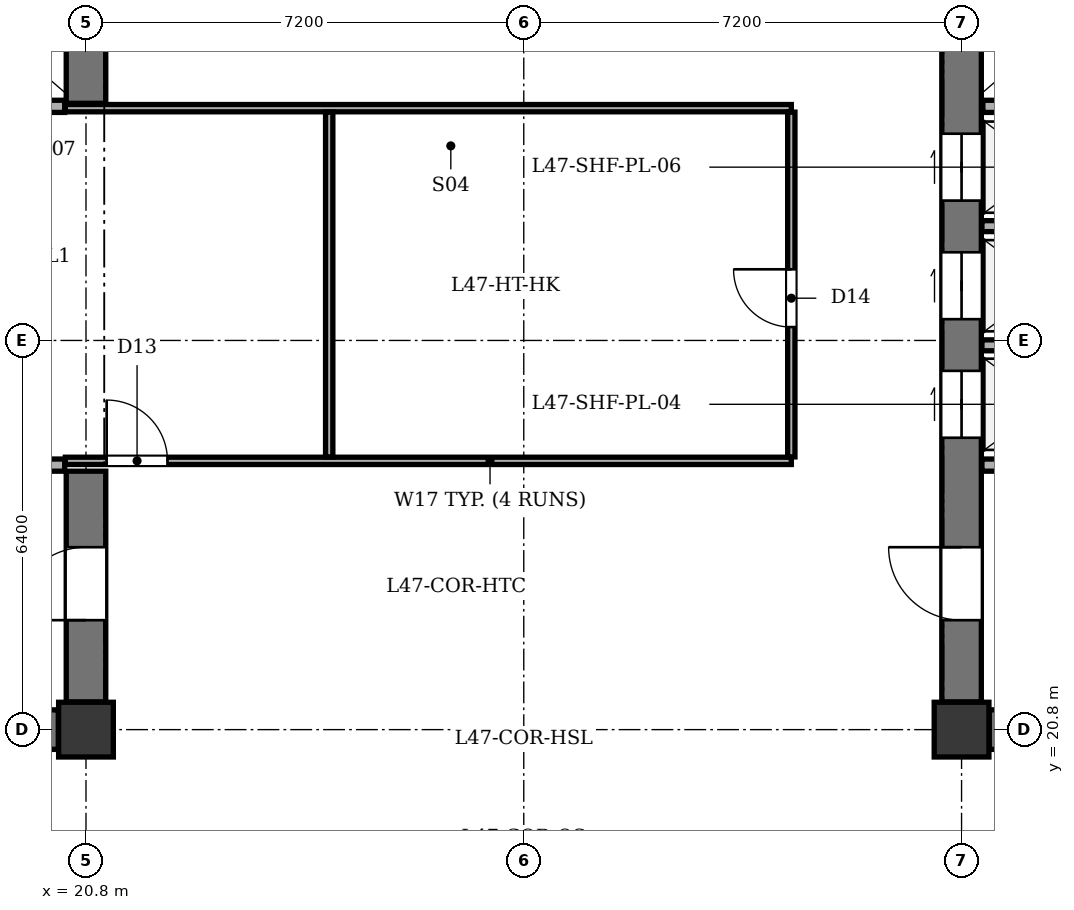
"""IFC4 building model, lengths in metres.
Left out: names, types, materials, properties, quantities, classifications, styles, units other than length and angle.
Written with IfcOpenShell. Run it as: python <this file> out.ifc"""

import sys

from ifc_helpers import new_model, si_unit, direction, frame, frame_2d, origin, origin_2d, place, context, subcontext, project, spatial, rectangle, extrude, element, fill, save


model = new_model("IFC4")
c1 = context("Model", 3, precision=1e-05, world=origin(), true_north=direction((0.0, 1.0)))
c2 = subcontext(c1, "Body", "Model", "MODEL_VIEW")
j1 = project(units=[si_unit("LENGTHUNIT", "METRE"), si_unit("PLANEANGLEUNIT", "RADIAN")], contexts=[c1])
p1 = place(None, origin())
s1 = spatial("IfcSite", under=j1, at=p1, CompositionType="ELEMENT")
p2 = place(p1, origin())
s2 = spatial("IfcBuilding", under=s1, at=p2, CompositionType="ELEMENT")
p3 = place(p2, frame((0.0, 0.0, 183.3)))
s3 = spatial("IfcBuildingStorey", under=s2, at=p3, CompositionType="ELEMENT", Elevation=183.3)
for number, where, z_axis, x_axis in (
    (1, (20.8, 20.8, 0.0), (0.0, 0.0, 1.0), (1.0, 0.0, 0.0)),
    (2, (35.2, 20.8, 0.0), (0.0, 0.0, 1.0), (1.0, 0.0, 0.0)),
):
    element("IfcColumn", number, at=place(p3, frame(where, z_axis=z_axis, x_axis=x_axis)), inside=s3, PredefinedType="COLUMN", context=c2, shape_type="SweptSolid", body=[
        extrude(rectangle(XDim=0.9, YDim=0.9, at=origin_2d()), origin(), (0.0, 0.0, 1.0), 3.5),
    ])
p4 = place(p3, frame((13.255, 20.8, 0.0), z_axis=(0.0, 0.0, 1.0), x_axis=(1.0, 0.0, 0.0)))
e3 = element("IfcWall", 3, at=p4, inside=s3, PredefinedType="SHEAR", context=c2, shape_type="SweptSolid", body=[
    extrude(rectangle(XDim=7.09, YDim=0.65, at=frame_2d((3.545, 0.0))), origin(), (0.0, 0.0, 1.0), 3.2),
])
p5 = place(p3, frame((20.8, 21.255, 0.0), z_axis=(0.0, 0.0, 1.0), x_axis=(0.0, 1.0, 0.0)))
e4 = element("IfcWall", 4, at=p5, inside=s3, PredefinedType="SHEAR", context=c2, shape_type="SweptSolid", body=[
    extrude(rectangle(XDim=3.795, YDim=0.65, at=frame_2d((1.897, 0.0))), origin(), (0.0, 0.0, 1.0), 3.2),
])
p6 = place(p5, frame((1.345, 0.0, 0.0)))
e5 = element("IfcOpeningElement", 5, at=p6, cuts=e4, PredefinedType="OPENING", context=c2, shape_type="SweptSolid", body=[
    extrude(rectangle(XDim=1.2, YDim=2.15, at=frame_2d((0.6, 1.075))), frame((0.0, 0.335, 0.0), z_axis=(0.0, -1.0, 0.0), x_axis=(1.0, 0.0, 0.0)), (0.0, 0.0, 1.0), 0.67),
])
p7 = place(p3, frame((20.8, 31.1, 0.0), z_axis=(0.0, 0.0, 1.0), x_axis=(0.0, 1.0, 0.0)))
e6 = element("IfcWall", 6, at=p7, inside=s3, PredefinedType="SHEAR", context=c2, shape_type="SweptSolid", body=[
    extrude(rectangle(XDim=2.045, YDim=0.65, at=frame_2d((1.022, 0.0))), origin(), (0.0, 0.0, 1.0), 3.2),
])
for number, where, z_axis, x_axis in (
    (7, (16.6, 25.15, 0.0), (0.0, 0.0, 1.0), (1.0, 0.0, 0.0)),
    (8, (16.6, 31.05, 0.0), (0.0, 0.0, 1.0), (1.0, 0.0, 0.0)),
):
    element("IfcWall", number, at=place(p3, frame(where, z_axis=z_axis, x_axis=x_axis)), inside=s3, PredefinedType="SOLIDWALL", context=c2, shape_type="SweptSolid", body=[
        extrude(rectangle(XDim=3.85, YDim=0.2, at=frame_2d((1.925, 0.0))), origin(), (0.0, 0.0, 1.0), 3.2),
    ])
p8 = place(p3, frame((35.655, 20.8, 0.0), z_axis=(0.0, 0.0, 1.0), x_axis=(1.0, 0.0, 0.0)))
e9 = element("IfcWall", 9, at=p8, inside=s3, PredefinedType="SHEAR", context=c2, shape_type="SweptSolid", body=[
    extrude(rectangle(XDim=7.09, YDim=0.65, at=frame_2d((3.545, 0.0))), origin(), (0.0, 0.0, 1.0), 3.2),
])
p9 = place(p3, frame((35.2, 21.255, 0.0), z_axis=(0.0, 0.0, 1.0), x_axis=(0.0, 1.0, 0.0)))
e10 = element("IfcWall", 10, at=p9, inside=s3, PredefinedType="SHEAR", context=c2, shape_type="SweptSolid", body=[
    extrude(rectangle(XDim=11.89, YDim=0.65, at=frame_2d((5.945, 0.0))), origin(), (0.0, 0.0, 1.0), 3.2),
])
p10 = place(p9, frame((1.345, 0.0, 0.0)))
e11 = element("IfcOpeningElement", 11, at=p10, cuts=e10, PredefinedType="OPENING", context=c2, shape_type="SweptSolid", body=[
    extrude(rectangle(XDim=1.2, YDim=2.15, at=frame_2d((0.6, 1.075))), frame((0.0, 0.335, 0.0), z_axis=(0.0, -1.0, 0.0), x_axis=(1.0, 0.0, 0.0)), (0.0, 0.0, 1.0), 0.67),
])
p11 = place(p9, frame((4.345, 0.0, 0.0)))
e12 = element("IfcOpeningElement", 12, at=p11, cuts=e10, PredefinedType="OPENING", context=c2, shape_type="SweptSolid", body=[
    extrude(rectangle(XDim=1.1, YDim=2.1, at=frame_2d((0.55, 1.05))), frame((0.0, 0.335, 0.0), z_axis=(0.0, -1.0, 0.0), x_axis=(1.0, 0.0, 0.0)), (0.0, 0.0, 1.0), 0.67),
])
p12 = place(p9, frame((6.295, 0.0, 0.0)))
e13 = element("IfcOpeningElement", 13, at=p12, cuts=e10, PredefinedType="OPENING", context=c2, shape_type="SweptSolid", body=[
    extrude(rectangle(XDim=1.1, YDim=2.1, at=frame_2d((0.55, 1.05))), frame((0.0, 0.335, 0.0), z_axis=(0.0, -1.0, 0.0), x_axis=(1.0, 0.0, 0.0)), (0.0, 0.0, 1.0), 0.67),
])
p13 = place(p9, frame((8.245, 0.0, 0.0)))
e14 = element("IfcOpeningElement", 14, at=p13, cuts=e10, PredefinedType="OPENING", context=c2, shape_type="SweptSolid", body=[
    extrude(rectangle(XDim=1.1, YDim=2.1, at=frame_2d((0.55, 1.05))), frame((0.0, 0.335, 0.0), z_axis=(0.0, -1.0, 0.0), x_axis=(1.0, 0.0, 0.0)), (0.0, 0.0, 1.0), 0.67),
])
p14 = place(p3, frame((35.535, 25.15, 0.0), z_axis=(0.0, 0.0, 1.0), x_axis=(1.0, 0.0, 0.0)))
e15 = element("IfcWall", 15, at=p14, inside=s3, PredefinedType="SOLIDWALL", context=c2, shape_type="SweptSolid", body=[
    extrude(rectangle(XDim=3.865, YDim=0.2, at=frame_2d((1.933, 0.0))), origin(), (0.0, 0.0, 1.0), 3.2),
])
p15 = place(p3, frame((35.55, 31.05, 0.0), z_axis=(0.0, 0.0, 1.0), x_axis=(1.0, 0.0, 0.0)))
e16 = element("IfcWall", 16, at=p15, inside=s3, PredefinedType="SOLIDWALL", context=c2, shape_type="SweptSolid", body=[
    extrude(rectangle(XDim=2.25, YDim=0.2, at=frame_2d((1.125, 0.0))), origin(), (0.0, 0.0, 1.0), 3.2),
])
for number, where, z_axis, x_axis in (
    (17, (35.535, 27.12, 0.0), (0.0, 0.0, 1.0), (1.0, 0.0, 0.0)),
    (18, (35.535, 29.08, 0.0), (0.0, 0.0, 1.0), (1.0, 0.0, 0.0)),
):
    element("IfcWall", number, at=place(p3, frame(where, z_axis=z_axis, x_axis=x_axis)), inside=s3, PredefinedType="PARTITIONING", context=c2, shape_type="SweptSolid", body=[
        extrude(rectangle(XDim=2.245, YDim=0.18, at=frame_2d((1.123, 0.0))), origin(), (0.0, 0.0, 1.0), 3.2),
    ])
p16 = place(p3, frame((20.46, 25.22, 0.0), z_axis=(0.0, 0.0, 1.0), x_axis=(1.0, 0.0, 0.0)))
e19 = element("IfcWall", 19, at=p16, inside=s3, PredefinedType="PARTITIONING", context=c2, shape_type="SweptSolid", body=[
    extrude(rectangle(XDim=11.94, YDim=0.12, at=frame_2d((5.97, 0.0))), origin(), (0.0, 0.0, 1.0), 3.2),
])
p17 = place(p16, frame((0.68, 0.0, 0.0)))
e20 = element("IfcOpeningElement", 20, at=p17, cuts=e19, PredefinedType="OPENING", context=c2, shape_type="SweptSolid", body=[
    extrude(rectangle(XDim=1.0, YDim=2.1, at=frame_2d((0.5, 1.05))), frame((0.0, 0.07, 0.0), z_axis=(0.0, -1.0, 0.0), x_axis=(1.0, 0.0, 0.0)), (0.0, 0.0, 1.0), 0.14),
])
p18 = place(p3, frame((20.46, 31.02, 0.0), z_axis=(0.0, 0.0, 1.0), x_axis=(1.0, 0.0, 0.0)))
e21 = element("IfcWall", 21, at=p18, inside=s3, PredefinedType="PARTITIONING", context=c2, shape_type="SweptSolid", body=[
    extrude(rectangle(XDim=11.94, YDim=0.12, at=frame_2d((5.97, 0.0))), origin(), (0.0, 0.0, 1.0), 3.2),
])
p19 = place(p3, frame((32.4, 25.285, 0.0), z_axis=(0.0, 0.0, 1.0), x_axis=(0.0, 1.0, 0.0)))
e22 = element("IfcWall", 22, at=p19, inside=s3, PredefinedType="PARTITIONING", context=c2, shape_type="SweptSolid", body=[
    extrude(rectangle(XDim=5.67, YDim=0.12, at=frame_2d((2.835, 0.0))), origin(), (0.0, 0.0, 1.0), 3.2),
])
p20 = place(p19, frame((2.135, 0.0, 0.0)))
e23 = element("IfcOpeningElement", 23, at=p20, cuts=e22, PredefinedType="OPENING", context=c2, shape_type="SweptSolid", body=[
    extrude(rectangle(XDim=0.95, YDim=2.1, at=frame_2d((0.475, 1.05))), frame((0.0, 0.07, 0.0), z_axis=(0.0, -1.0, 0.0), x_axis=(1.0, 0.0, 0.0)), (0.0, 0.0, 1.0), 0.14),
])
p21 = place(p3, frame((24.8, 25.285, 0.0), z_axis=(0.0, 0.0, 1.0), x_axis=(0.0, 1.0, 0.0)))
e24 = element("IfcWall", 24, at=p21, inside=s3, PredefinedType="PARTITIONING", context=c2, shape_type="SweptSolid", body=[
    extrude(rectangle(XDim=5.67, YDim=0.12, at=frame_2d((2.835, 0.0))), origin(), (0.0, 0.0, 1.0), 3.2),
])
p22 = place(p6, origin())
e25 = element("IfcDoor", 25, at=p22, inside=s3, OperationType="SINGLE_SWING_LEFT", PredefinedType="DOOR", context=c2, shape_type="SweptSolid", body=[
    extrude(rectangle(XDim=1.2, YDim=2.15, at=frame_2d((0.6, 1.075))), frame((0.0, 0.025, 0.0), z_axis=(0.0, -1.0, 0.0), x_axis=(1.0, 0.0, 0.0)), (0.0, 0.0, 1.0), 0.05),
])
fill(e5, e25)
p23 = place(p10, origin())
e26 = element("IfcDoor", 26, at=p23, inside=s3, OperationType="SINGLE_SWING_RIGHT", PredefinedType="DOOR", context=c2, shape_type="SweptSolid", body=[
    extrude(rectangle(XDim=1.2, YDim=2.15, at=frame_2d((0.6, 1.075))), frame((0.0, 0.025, 0.0), z_axis=(0.0, -1.0, 0.0), x_axis=(1.0, 0.0, 0.0)), (0.0, 0.0, 1.0), 0.05),
])
fill(e11, e26)
p24 = place(p11, origin())
e27 = element("IfcDoor", 27, at=p24, inside=s3, OperationType="DOUBLE_DOOR_SLIDING", PredefinedType="DOOR", context=c2, shape_type="SweptSolid", body=[
    extrude(rectangle(XDim=1.1, YDim=2.1, at=frame_2d((0.55, 1.05))), frame((0.0, 0.025, 0.0), z_axis=(0.0, -1.0, 0.0), x_axis=(1.0, 0.0, 0.0)), (0.0, 0.0, 1.0), 0.05),
])
fill(e12, e27)
p25 = place(p12, origin())
e28 = element("IfcDoor", 28, at=p25, inside=s3, OperationType="DOUBLE_DOOR_SLIDING", PredefinedType="DOOR", context=c2, shape_type="SweptSolid", body=[
    extrude(rectangle(XDim=1.1, YDim=2.1, at=frame_2d((0.55, 1.05))), frame((0.0, 0.025, 0.0), z_axis=(0.0, -1.0, 0.0), x_axis=(1.0, 0.0, 0.0)), (0.0, 0.0, 1.0), 0.05),
])
fill(e13, e28)
p26 = place(p13, origin())
e29 = element("IfcDoor", 29, at=p26, inside=s3, OperationType="DOUBLE_DOOR_SLIDING", PredefinedType="DOOR", context=c2, shape_type="SweptSolid", body=[
    extrude(rectangle(XDim=1.1, YDim=2.1, at=frame_2d((0.55, 1.05))), frame((0.0, 0.025, 0.0), z_axis=(0.0, -1.0, 0.0), x_axis=(1.0, 0.0, 0.0)), (0.0, 0.0, 1.0), 0.05),
])
fill(e14, e29)
p27 = place(p17, origin())
e30 = element("IfcDoor", 30, at=p27, inside=s3, OperationType="SINGLE_SWING_LEFT", PredefinedType="DOOR", context=c2, shape_type="SweptSolid", body=[
    extrude(rectangle(XDim=1.0, YDim=2.1, at=frame_2d((0.5, 1.05))), frame((0.0, 0.025, 0.0), z_axis=(0.0, -1.0, 0.0), x_axis=(1.0, 0.0, 0.0)), (0.0, 0.0, 1.0), 0.05),
])
fill(e20, e30)
p28 = place(p20, origin())
e31 = element("IfcDoor", 31, at=p28, inside=s3, OperationType="SINGLE_SWING_RIGHT", PredefinedType="DOOR", context=c2, shape_type="SweptSolid", body=[
    extrude(rectangle(XDim=0.95, YDim=2.1, at=frame_2d((0.475, 1.05))), frame((0.0, 0.025, 0.0), z_axis=(0.0, -1.0, 0.0), x_axis=(1.0, 0.0, 0.0)), (0.0, 0.0, 1.0), 0.05),
])
fill(e23, e31)
save(model, sys.argv[1])
